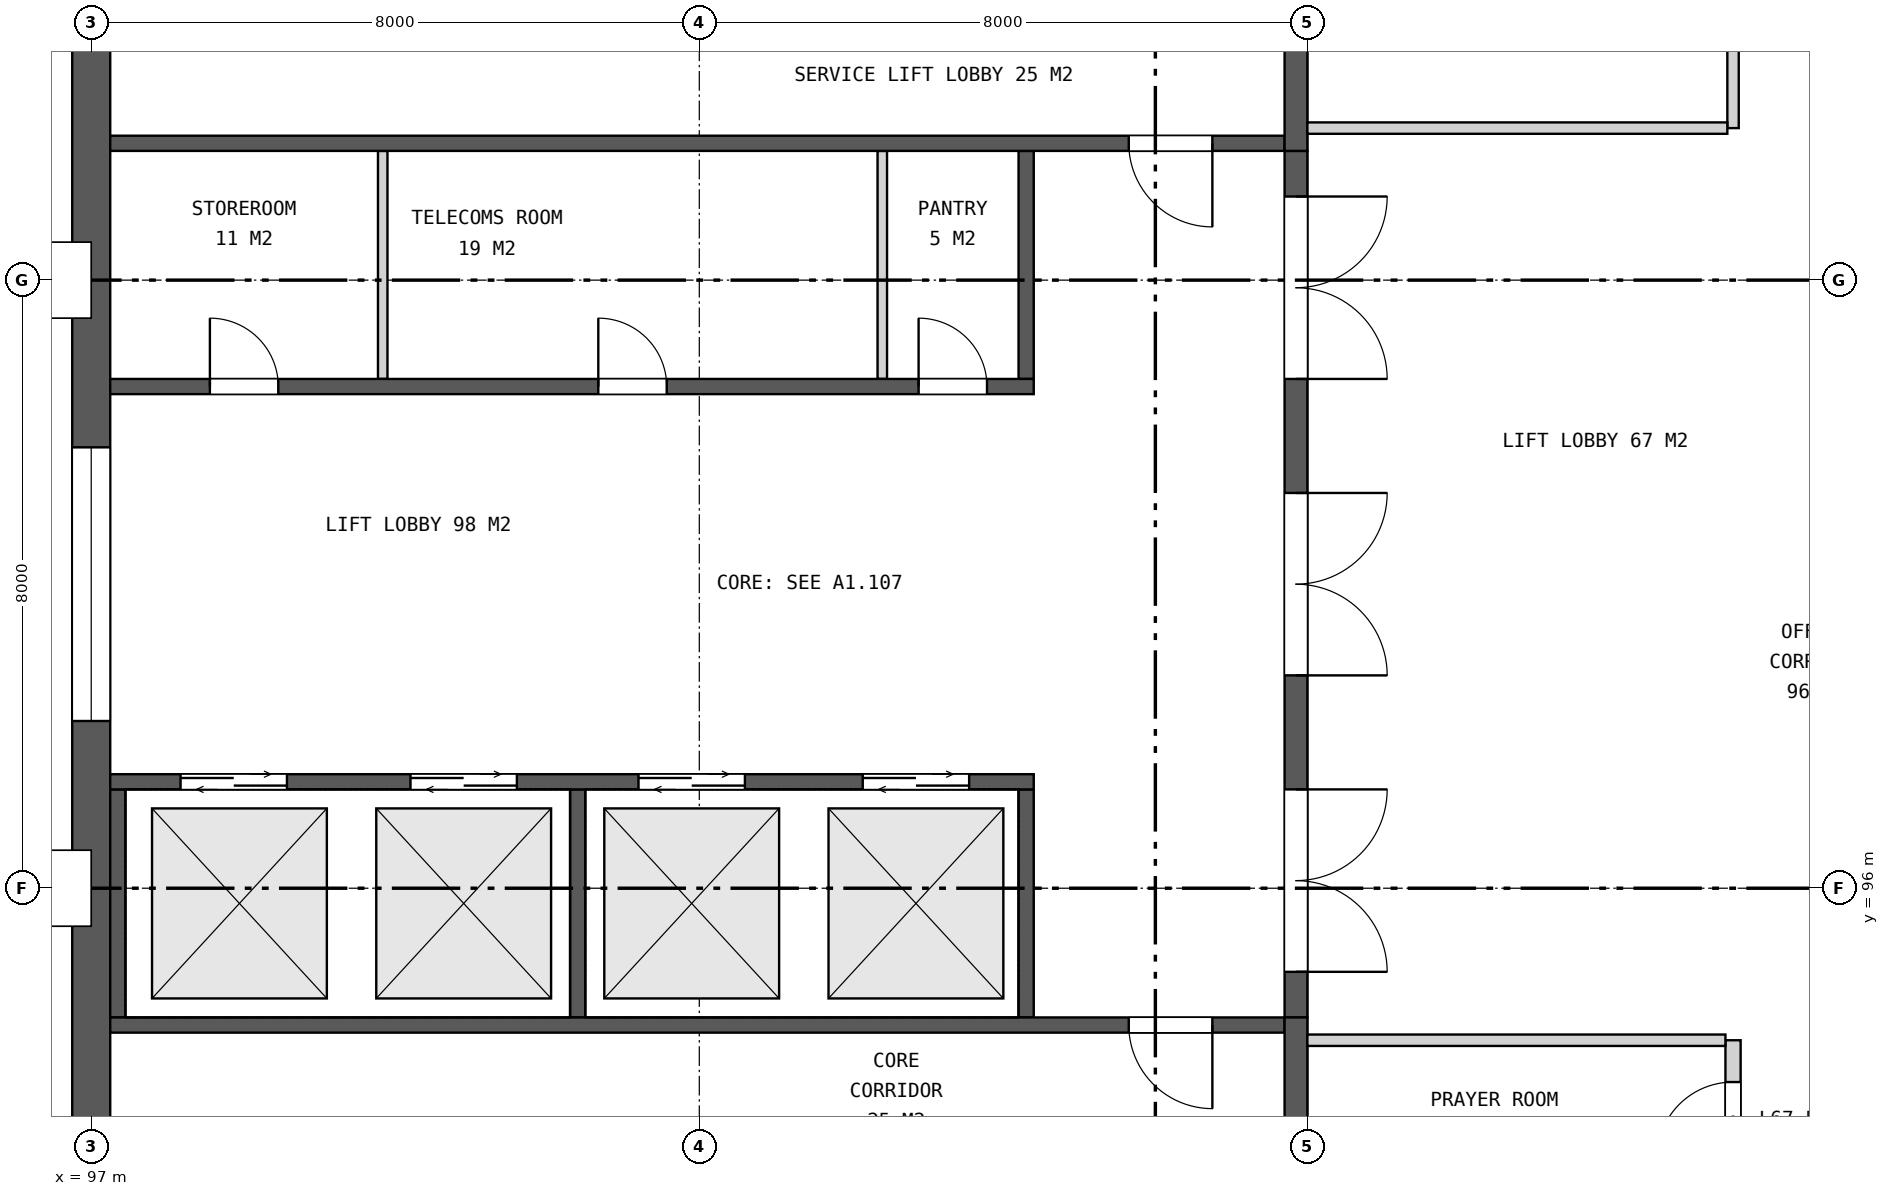
"""IFC4 building model, lengths in metres.
Left out: names, types, materials, properties, quantities, classifications, styles, units other than length and angle.
Written with IfcOpenShell. Run it as: python <this file> out.ifc"""

import sys

from ifc_helpers import new_model, si_unit, direction, frame, frame_2d, origin, place, context, subcontext, project, spatial, rectangle, extrude, element, fill, save


model = new_model("IFC4")
c1 = context("Model", 3, precision=1e-05, world=origin(), true_north=direction((0.0, 1.0)))
c2 = subcontext(c1, "Body", "Model", "MODEL_VIEW")
j1 = project(units=[si_unit("LENGTHUNIT", "METRE"), si_unit("PLANEANGLEUNIT", "RADIAN")], contexts=[c1])
p1 = place(None, origin())
s1 = spatial("IfcSite", under=j1, at=p1, CompositionType="ELEMENT")
p2 = place(p1, origin())
s2 = spatial("IfcBuilding", under=s1, at=p2, CompositionType="ELEMENT")
p3 = place(p2, frame((0.0, 0.0, 311.3)))
s3 = spatial("IfcBuildingStorey", under=s2, at=p3, CompositionType="ELEMENT", Elevation=311.3)
p4 = place(p3, frame((97.0, 111.75, 0.0), z_axis=(0.0, 0.0, 1.0), x_axis=(0.0, -1.0, 0.0)))
e1 = element("IfcWall", 1, at=p4, inside=s3, PredefinedType="SHEAR", context=c2, shape_type="SweptSolid", body=[
    extrude(rectangle(XDim=23.5, YDim=0.5, at=frame_2d((11.75, 0.0))), origin(), (0.0, 0.0, 1.0), 4.2),
])
p5 = place(p4, frame((9.95, 0.0, 0.15)))
e2 = element("IfcOpeningElement", 2, at=p5, cuts=e1, PredefinedType="OPENING", context=c2, shape_type="SweptSolid", body=[
    extrude(rectangle(XDim=3.6, YDim=3.0, at=frame_2d((1.8, 1.5))), frame((0.0, 0.26, 0.0), z_axis=(0.0, -1.0, 0.0), x_axis=(1.0, 0.0, 0.0)), (0.0, 0.0, 1.0), 0.52),
])
p6 = place(p3, frame((112.85, 105.7, 0.0), z_axis=(0.0, 0.0, 1.0), x_axis=(0.0, -1.0, 0.0)))
e3 = element("IfcWall", 3, at=p6, inside=s3, PredefinedType="SHEAR", context=c2, shape_type="SweptSolid", body=[
    extrude(rectangle(XDim=11.4, YDim=0.3, at=frame_2d((5.7, 0.0))), origin(), (0.0, 0.0, 1.0), 4.2),
])
p7 = place(p6, frame((0.6, 0.0, 0.0)))
e4 = element("IfcOpeningElement", 4, at=p7, cuts=e3, PredefinedType="OPENING", context=c2, shape_type="SweptSolid", body=[
    extrude(rectangle(XDim=2.4, YDim=2.4, at=frame_2d((1.2, 1.2))), frame((0.0, 0.16, 0.0), z_axis=(0.0, -1.0, 0.0), x_axis=(1.0, 0.0, 0.0)), (0.0, 0.0, 1.0), 0.32),
])
p8 = place(p6, frame((4.5, 0.0, 0.0)))
e5 = element("IfcOpeningElement", 5, at=p8, cuts=e3, PredefinedType="OPENING", context=c2, shape_type="SweptSolid", body=[
    extrude(rectangle(XDim=2.4, YDim=2.4, at=frame_2d((1.2, 1.2))), frame((0.0, 0.16, 0.0), z_axis=(0.0, -1.0, 0.0), x_axis=(1.0, 0.0, 0.0)), (0.0, 0.0, 1.0), 0.32),
])
p9 = place(p6, frame((8.4, 0.0, 0.0)))
e6 = element("IfcOpeningElement", 6, at=p9, cuts=e3, PredefinedType="OPENING", context=c2, shape_type="SweptSolid", body=[
    extrude(rectangle(XDim=2.4, YDim=2.4, at=frame_2d((1.2, 1.2))), frame((0.0, 0.16, 0.0), z_axis=(0.0, -1.0, 0.0), x_axis=(1.0, 0.0, 0.0)), (0.0, 0.0, 1.0), 0.32),
])
for number, where, z_axis, x_axis in (
    (7, (109.3, 97.3, 0.0), (0.0, 0.0, 1.0), (0.0, -1.0, 0.0)),
    (8, (103.4, 97.3, 0.0), (0.0, 0.0, 1.0), (0.0, -1.0, 0.0)),
    (9, (97.35, 97.3, 0.0), (0.0, 0.0, 1.0), (0.0, -1.0, 0.0)),
):
    element("IfcWall", number, at=place(p3, frame(where, z_axis=z_axis, x_axis=x_axis)), inside=s3, PredefinedType="SHEAR", context=c2, shape_type="SweptSolid", body=[
        extrude(rectangle(XDim=3.0, YDim=0.2, at=frame_2d((1.5, 0.0))), origin(), (0.0, 0.0, 1.0), 4.2),
    ])
p10 = place(p3, frame((109.4, 97.4, 0.0), z_axis=(0.0, 0.0, 1.0), x_axis=(-1.0, 0.0, 0.0)))
e10 = element("IfcWall", 10, at=p10, inside=s3, PredefinedType="SHEAR", context=c2, shape_type="SweptSolid", body=[
    extrude(rectangle(XDim=12.15, YDim=0.2, at=frame_2d((6.075, 0.0))), origin(), (0.0, 0.0, 1.0), 4.2),
])
p11 = place(p10, frame((0.85, 0.0, 0.0)))
e11 = element("IfcOpeningElement", 11, at=p11, cuts=e10, PredefinedType="OPENING", context=c2, shape_type="SweptSolid", body=[
    extrude(rectangle(XDim=1.4, YDim=2.1, at=frame_2d((0.7, 1.05))), frame((0.0, 0.11, 0.0), z_axis=(0.0, -1.0, 0.0), x_axis=(1.0, 0.0, 0.0)), (0.0, 0.0, 1.0), 0.22),
])
p12 = place(p10, frame((3.8, 0.0, 0.0)))
e12 = element("IfcOpeningElement", 12, at=p12, cuts=e10, PredefinedType="OPENING", context=c2, shape_type="SweptSolid", body=[
    extrude(rectangle(XDim=1.4, YDim=2.1, at=frame_2d((0.7, 1.05))), frame((0.0, 0.11, 0.0), z_axis=(0.0, -1.0, 0.0), x_axis=(1.0, 0.0, 0.0)), (0.0, 0.0, 1.0), 0.22),
])
p13 = place(p10, frame((6.8, 0.0, 0.0)))
e13 = element("IfcOpeningElement", 13, at=p13, cuts=e10, PredefinedType="OPENING", context=c2, shape_type="SweptSolid", body=[
    extrude(rectangle(XDim=1.4, YDim=2.1, at=frame_2d((0.7, 1.05))), frame((0.0, 0.11, 0.0), z_axis=(0.0, -1.0, 0.0), x_axis=(1.0, 0.0, 0.0)), (0.0, 0.0, 1.0), 0.22),
])
p14 = place(p10, frame((9.825, 0.0, 0.0)))
e14 = element("IfcOpeningElement", 14, at=p14, cuts=e10, PredefinedType="OPENING", context=c2, shape_type="SweptSolid", body=[
    extrude(rectangle(XDim=1.4, YDim=2.1, at=frame_2d((0.7, 1.05))), frame((0.0, 0.11, 0.0), z_axis=(0.0, -1.0, 0.0), x_axis=(1.0, 0.0, 0.0)), (0.0, 0.0, 1.0), 0.22),
])
p15 = place(p3, frame((109.3, 105.7, 0.0), z_axis=(0.0, 0.0, 1.0), x_axis=(0.0, -1.0, 0.0)))
e15 = element("IfcWall", 15, at=p15, inside=s3, PredefinedType="SHEAR", context=c2, shape_type="SweptSolid", body=[
    extrude(rectangle(XDim=3.0, YDim=0.2, at=frame_2d((1.5, 0.0))), origin(), (0.0, 0.0, 1.0), 4.2),
])
for number, where, z_axis, x_axis in (
    (16, (107.407, 105.7, 0.0), (0.0, 0.0, 1.0), (0.0, -1.0, 0.0)),
    (17, (100.835, 105.7, 0.0), (0.0, 0.0, 1.0), (0.0, -1.0, 0.0)),
):
    element("IfcWall", number, at=place(p3, frame(where, z_axis=z_axis, x_axis=x_axis)), inside=s3, PredefinedType="PARTITIONING", context=c2, shape_type="SweptSolid", body=[
        extrude(rectangle(XDim=3.0, YDim=0.125, at=frame_2d((1.5, 0.0))), origin(), (0.0, 0.0, 1.0), 4.2),
    ])
p16 = place(p3, frame((109.4, 102.6, 0.0), z_axis=(0.0, 0.0, 1.0), x_axis=(-1.0, 0.0, 0.0)))
e18 = element("IfcWall", 18, at=p16, inside=s3, PredefinedType="SHEAR", context=c2, shape_type="SweptSolid", body=[
    extrude(rectangle(XDim=12.15, YDim=0.2, at=frame_2d((6.075, 0.0))), origin(), (0.0, 0.0, 1.0), 4.2),
])
p17 = place(p16, frame((0.615, 0.0, 0.0)))
e19 = element("IfcOpeningElement", 19, at=p17, cuts=e18, PredefinedType="OPENING", context=c2, shape_type="SweptSolid", body=[
    extrude(rectangle(XDim=0.9, YDim=2.1, at=frame_2d((0.45, 1.05))), frame((0.0, 0.11, 0.0), z_axis=(0.0, -1.0, 0.0), x_axis=(1.0, 0.0, 0.0)), (0.0, 0.0, 1.0), 0.22),
])
p18 = place(p16, frame((4.829, 0.0, 0.0)))
e20 = element("IfcOpeningElement", 20, at=p18, cuts=e18, PredefinedType="OPENING", context=c2, shape_type="SweptSolid", body=[
    extrude(rectangle(XDim=0.9, YDim=2.1, at=frame_2d((0.45, 1.05))), frame((0.0, 0.11, 0.0), z_axis=(0.0, -1.0, 0.0), x_axis=(1.0, 0.0, 0.0)), (0.0, 0.0, 1.0), 0.22),
])
p19 = place(p16, frame((9.939, 0.0, 0.0)))
e21 = element("IfcOpeningElement", 21, at=p19, cuts=e18, PredefinedType="OPENING", context=c2, shape_type="SweptSolid", body=[
    extrude(rectangle(XDim=0.9, YDim=2.1, at=frame_2d((0.45, 1.05))), frame((0.0, 0.11, 0.0), z_axis=(0.0, -1.0, 0.0), x_axis=(1.0, 0.0, 0.0)), (0.0, 0.0, 1.0), 0.22),
])
p20 = place(p3, frame((112.7, 94.2, 0.0), z_axis=(0.0, 0.0, 1.0), x_axis=(-1.0, 0.0, 0.0)))
e22 = element("IfcWall", 22, at=p20, inside=s3, PredefinedType="SHEAR", context=c2, shape_type="SweptSolid", body=[
    extrude(rectangle(XDim=15.45, YDim=0.2, at=frame_2d((7.725, 0.0))), origin(), (0.0, 0.0, 1.0), 4.2),
])
p21 = place(p20, frame((0.95, 0.0, 0.0)))
e23 = element("IfcOpeningElement", 23, at=p21, cuts=e22, PredefinedType="OPENING", context=c2, shape_type="SweptSolid", body=[
    extrude(rectangle(XDim=1.1, YDim=2.1, at=frame_2d((0.55, 1.05))), frame((0.0, 0.11, 0.0), z_axis=(0.0, -1.0, 0.0), x_axis=(1.0, 0.0, 0.0)), (0.0, 0.0, 1.0), 0.22),
])
p22 = place(p3, frame((112.85, 94.3, 0.0), z_axis=(0.0, 0.0, 1.0), x_axis=(0.0, -1.0, 0.0)))
e24 = element("IfcWall", 24, at=p22, inside=s3, PredefinedType="SHEAR", context=c2, shape_type="SweptSolid", body=[
    extrude(rectangle(XDim=6.05, YDim=0.3, at=frame_2d((3.025, 0.0))), origin(), (0.0, 0.0, 1.0), 4.2),
])
p23 = place(p3, frame((112.7, 105.8, 0.0), z_axis=(0.0, 0.0, 1.0), x_axis=(-1.0, 0.0, 0.0)))
e25 = element("IfcWall", 25, at=p23, inside=s3, PredefinedType="SHEAR", context=c2, shape_type="SweptSolid", body=[
    extrude(rectangle(XDim=15.45, YDim=0.2, at=frame_2d((7.725, 0.0))), origin(), (0.0, 0.0, 1.0), 4.2),
])
p24 = place(p23, frame((0.95, 0.0, 0.0)))
e26 = element("IfcOpeningElement", 26, at=p24, cuts=e25, PredefinedType="OPENING", context=c2, shape_type="SweptSolid", body=[
    extrude(rectangle(XDim=1.1, YDim=2.1, at=frame_2d((0.55, 1.05))), frame((0.0, 0.11, 0.0), z_axis=(0.0, -1.0, 0.0), x_axis=(1.0, 0.0, 0.0)), (0.0, 0.0, 1.0), 0.22),
])
p25 = place(p3, frame((112.85, 111.75, 0.0), z_axis=(0.0, 0.0, 1.0), x_axis=(0.0, -1.0, 0.0)))
e27 = element("IfcWall", 27, at=p25, inside=s3, PredefinedType="SHEAR", context=c2, shape_type="SweptSolid", body=[
    extrude(rectangle(XDim=6.05, YDim=0.3, at=frame_2d((3.025, 0.0))), origin(), (0.0, 0.0, 1.0), 4.2),
])
p26 = place(p3, frame((118.6, 80.075, 0.0), z_axis=(0.0, 0.0, 1.0), x_axis=(0.0, 1.0, 0.0)))
e28 = element("IfcWall", 28, at=p26, inside=s3, PredefinedType="SOLIDWALL", context=c2, shape_type="SweptSolid", body=[
    extrude(rectangle(XDim=13.925, YDim=0.2, at=frame_2d((6.962, 0.0))), origin(), (0.0, 0.0, 1.0), 3.443),
])
p27 = place(p26, frame((12.375, 0.0, 0.0)))
e29 = element("IfcOpeningElement", 29, at=p27, cuts=e28, PredefinedType="OPENING", context=c2, shape_type="SweptSolid", body=[
    extrude(rectangle(XDim=1.0, YDim=2.1, at=frame_2d((0.5, 1.05))), frame((0.0, 0.11, 0.0), z_axis=(0.0, -1.0, 0.0), x_axis=(1.0, 0.0, 0.0)), (0.0, 0.0, 1.0), 0.22),
])
p28 = place(p26, frame((10.375, 0.0, 0.0)))
e30 = element("IfcOpeningElement", 30, at=p28, cuts=e28, PredefinedType="OPENING", context=c2, shape_type="SweptSolid", body=[
    extrude(rectangle(XDim=1.0, YDim=2.1, at=frame_2d((0.5, 1.05))), frame((0.0, 0.11, 0.0), z_axis=(0.0, -1.0, 0.0), x_axis=(1.0, 0.0, 0.0)), (0.0, 0.0, 1.0), 0.22),
])
p29 = place(p26, frame((8.375, 0.0, 0.0)))
e31 = element("IfcOpeningElement", 31, at=p29, cuts=e28, PredefinedType="OPENING", context=c2, shape_type="SweptSolid", body=[
    extrude(rectangle(XDim=1.0, YDim=2.1, at=frame_2d((0.5, 1.05))), frame((0.0, 0.11, 0.0), z_axis=(0.0, -1.0, 0.0), x_axis=(1.0, 0.0, 0.0)), (0.0, 0.0, 1.0), 0.22),
])
p30 = place(p26, frame((3.45, 0.0, 0.0)))
e32 = element("IfcOpeningElement", 32, at=p30, cuts=e28, PredefinedType="OPENING", context=c2, shape_type="SweptSolid", body=[
    extrude(rectangle(XDim=1.0, YDim=2.1, at=frame_2d((0.5, 1.05))), frame((0.0, 0.11, 0.0), z_axis=(0.0, -1.0, 0.0), x_axis=(1.0, 0.0, 0.0)), (0.0, 0.0, 1.0), 0.22),
])
p31 = place(p3, frame((118.6, 106.0, 0.0), z_axis=(0.0, 0.0, 1.0), x_axis=(0.0, 1.0, 0.0)))
e33 = element("IfcWall", 33, at=p31, inside=s3, PredefinedType="PARTITIONING", context=c2, shape_type="SweptSolid", body=[
    extrude(rectangle(XDim=13.925, YDim=0.15, at=frame_2d((6.962, 0.0))), origin(), (0.0, 0.0, 1.0), 3.443),
])
p32 = place(p31, frame((1.25, 0.0, 0.0)))
e34 = element("IfcOpeningElement", 34, at=p32, cuts=e33, PredefinedType="OPENING", context=c2, shape_type="SweptSolid", body=[
    extrude(rectangle(XDim=1.0, YDim=2.1, at=frame_2d((0.5, 1.05))), frame((0.0, 0.085, 0.0), z_axis=(0.0, -1.0, 0.0), x_axis=(1.0, 0.0, 0.0)), (0.0, 0.0, 1.0), 0.17),
])
p33 = place(p31, frame((4.25, 0.0, 0.0)))
e35 = element("IfcOpeningElement", 35, at=p33, cuts=e33, PredefinedType="OPENING", context=c2, shape_type="SweptSolid", body=[
    extrude(rectangle(XDim=1.0, YDim=2.1, at=frame_2d((0.5, 1.05))), frame((0.0, 0.085, 0.0), z_axis=(0.0, -1.0, 0.0), x_axis=(1.0, 0.0, 0.0)), (0.0, 0.0, 1.0), 0.17),
])
p34 = place(p31, frame((9.45, 0.0, 0.0)))
e36 = element("IfcOpeningElement", 36, at=p34, cuts=e33, PredefinedType="OPENING", context=c2, shape_type="SweptSolid", body=[
    extrude(rectangle(XDim=1.0, YDim=2.1, at=frame_2d((0.5, 1.05))), frame((0.0, 0.085, 0.0), z_axis=(0.0, -1.0, 0.0), x_axis=(1.0, 0.0, 0.0)), (0.0, 0.0, 1.0), 0.17),
])
p35 = place(p3, frame((113.0, 94.0, 0.0), z_axis=(0.0, 0.0, 1.0), x_axis=(1.0, 0.0, 0.0)))
e37 = element("IfcWall", 37, at=p35, inside=s3, PredefinedType="PARTITIONING", context=c2, shape_type="SweptSolid", body=[
    extrude(rectangle(XDim=5.5, YDim=0.15, at=frame_2d((2.75, 0.0))), origin(), (0.0, 0.0, 1.0), 3.443),
])
p36 = place(p3, frame((113.0, 106.0, 0.0), z_axis=(0.0, 0.0, 1.0), x_axis=(1.0, 0.0, 0.0)))
e38 = element("IfcWall", 38, at=p36, inside=s3, PredefinedType="PARTITIONING", context=c2, shape_type="SweptSolid", body=[
    extrude(rectangle(XDim=5.525, YDim=0.15, at=frame_2d((2.762, 0.0))), origin(), (0.0, 0.0, 1.0), 3.443),
])
p37 = place(p5, origin())
e39 = element("IfcWindow", 39, at=p37, inside=s3, PartitioningType="SINGLE_PANEL", PredefinedType="WINDOW", context=c2, shape_type="SweptSolid", body=[
    extrude(rectangle(XDim=3.6, YDim=3.0, at=frame_2d((1.8, 1.5))), frame((0.0, 0.03, 0.0), z_axis=(0.0, -1.0, 0.0), x_axis=(1.0, 0.0, 0.0)), (0.0, 0.0, 1.0), 0.06),
])
fill(e2, e39)
p38 = place(p7, origin())
e40 = element("IfcDoor", 40, at=p38, inside=s3, OperationType="DOUBLE_DOOR_SINGLE_SWING", PredefinedType="DOOR", context=c2, shape_type="SweptSolid", body=[
    extrude(rectangle(XDim=2.4, YDim=2.4, at=frame_2d((1.2, 1.2))), frame((0.0, 0.025, 0.0), z_axis=(0.0, -1.0, 0.0), x_axis=(1.0, 0.0, 0.0)), (0.0, 0.0, 1.0), 0.05),
])
fill(e4, e40)
p39 = place(p8, origin())
e41 = element("IfcDoor", 41, at=p39, inside=s3, OperationType="DOUBLE_DOOR_SINGLE_SWING", PredefinedType="DOOR", context=c2, shape_type="SweptSolid", body=[
    extrude(rectangle(XDim=2.4, YDim=2.4, at=frame_2d((1.2, 1.2))), frame((0.0, 0.025, 0.0), z_axis=(0.0, -1.0, 0.0), x_axis=(1.0, 0.0, 0.0)), (0.0, 0.0, 1.0), 0.05),
])
fill(e5, e41)
p40 = place(p9, origin())
e42 = element("IfcDoor", 42, at=p40, inside=s3, OperationType="DOUBLE_DOOR_SINGLE_SWING", PredefinedType="DOOR", context=c2, shape_type="SweptSolid", body=[
    extrude(rectangle(XDim=2.4, YDim=2.4, at=frame_2d((1.2, 1.2))), frame((0.0, 0.025, 0.0), z_axis=(0.0, -1.0, 0.0), x_axis=(1.0, 0.0, 0.0)), (0.0, 0.0, 1.0), 0.05),
])
fill(e6, e42)
p41 = place(p11, origin())
e43 = element("IfcDoor", 43, at=p41, inside=s3, OperationType="DOUBLE_DOOR_SLIDING", PredefinedType="DOOR", context=c2, shape_type="SweptSolid", body=[
    extrude(rectangle(XDim=1.4, YDim=2.1, at=frame_2d((0.7, 1.05))), frame((0.0, 0.025, 0.0), z_axis=(0.0, -1.0, 0.0), x_axis=(1.0, 0.0, 0.0)), (0.0, 0.0, 1.0), 0.05),
])
fill(e11, e43)
p42 = place(p12, origin())
e44 = element("IfcDoor", 44, at=p42, inside=s3, OperationType="DOUBLE_DOOR_SLIDING", PredefinedType="DOOR", context=c2, shape_type="SweptSolid", body=[
    extrude(rectangle(XDim=1.4, YDim=2.1, at=frame_2d((0.7, 1.05))), frame((0.0, 0.025, 0.0), z_axis=(0.0, -1.0, 0.0), x_axis=(1.0, 0.0, 0.0)), (0.0, 0.0, 1.0), 0.05),
])
fill(e12, e44)
p43 = place(p13, origin())
e45 = element("IfcDoor", 45, at=p43, inside=s3, OperationType="DOUBLE_DOOR_SLIDING", PredefinedType="DOOR", context=c2, shape_type="SweptSolid", body=[
    extrude(rectangle(XDim=1.4, YDim=2.1, at=frame_2d((0.7, 1.05))), frame((0.0, 0.025, 0.0), z_axis=(0.0, -1.0, 0.0), x_axis=(1.0, 0.0, 0.0)), (0.0, 0.0, 1.0), 0.05),
])
fill(e13, e45)
p44 = place(p14, origin())
e46 = element("IfcDoor", 46, at=p44, inside=s3, OperationType="DOUBLE_DOOR_SLIDING", PredefinedType="DOOR", context=c2, shape_type="SweptSolid", body=[
    extrude(rectangle(XDim=1.4, YDim=2.1, at=frame_2d((0.7, 1.05))), frame((0.0, 0.025, 0.0), z_axis=(0.0, -1.0, 0.0), x_axis=(1.0, 0.0, 0.0)), (0.0, 0.0, 1.0), 0.05),
])
fill(e14, e46)
p45 = place(p17, frame((0.9, 0.0, 0.0), z_axis=(0.0, 0.0, 1.0), x_axis=(-1.0, 0.0, 0.0)))
e47 = element("IfcDoor", 47, at=p45, inside=s3, OperationType="SINGLE_SWING_LEFT", PredefinedType="DOOR", context=c2, shape_type="SweptSolid", body=[
    extrude(rectangle(XDim=0.9, YDim=2.1, at=frame_2d((0.45, 1.05))), frame((0.0, 0.025, 0.0), z_axis=(0.0, -1.0, 0.0), x_axis=(1.0, 0.0, 0.0)), (0.0, 0.0, 1.0), 0.05),
])
fill(e19, e47)
p46 = place(p18, frame((0.9, 0.0, 0.0), z_axis=(0.0, 0.0, 1.0), x_axis=(-1.0, 0.0, 0.0)))
e48 = element("IfcDoor", 48, at=p46, inside=s3, OperationType="SINGLE_SWING_LEFT", PredefinedType="DOOR", context=c2, shape_type="SweptSolid", body=[
    extrude(rectangle(XDim=0.9, YDim=2.1, at=frame_2d((0.45, 1.05))), frame((0.0, 0.025, 0.0), z_axis=(0.0, -1.0, 0.0), x_axis=(1.0, 0.0, 0.0)), (0.0, 0.0, 1.0), 0.05),
])
fill(e20, e48)
p47 = place(p19, frame((0.9, 0.0, 0.0), z_axis=(0.0, 0.0, 1.0), x_axis=(-1.0, 0.0, 0.0)))
e49 = element("IfcDoor", 49, at=p47, inside=s3, OperationType="SINGLE_SWING_LEFT", PredefinedType="DOOR", context=c2, shape_type="SweptSolid", body=[
    extrude(rectangle(XDim=0.9, YDim=2.1, at=frame_2d((0.45, 1.05))), frame((0.0, 0.025, 0.0), z_axis=(0.0, -1.0, 0.0), x_axis=(1.0, 0.0, 0.0)), (0.0, 0.0, 1.0), 0.05),
])
fill(e21, e49)
p48 = place(p21, origin())
e50 = element("IfcDoor", 50, at=p48, inside=s3, OperationType="SINGLE_SWING_LEFT", PredefinedType="DOOR", context=c2, shape_type="SweptSolid", body=[
    extrude(rectangle(XDim=1.1, YDim=2.1, at=frame_2d((0.55, 1.05))), frame((0.0, 0.025, 0.0), z_axis=(0.0, -1.0, 0.0), x_axis=(1.0, 0.0, 0.0)), (0.0, 0.0, 1.0), 0.05),
])
fill(e23, e50)
p49 = place(p24, origin())
e51 = element("IfcDoor", 51, at=p49, inside=s3, OperationType="SINGLE_SWING_LEFT", PredefinedType="DOOR", context=c2, shape_type="SweptSolid", body=[
    extrude(rectangle(XDim=1.1, YDim=2.1, at=frame_2d((0.55, 1.05))), frame((0.0, 0.025, 0.0), z_axis=(0.0, -1.0, 0.0), x_axis=(1.0, 0.0, 0.0)), (0.0, 0.0, 1.0), 0.05),
])
fill(e26, e51)
p50 = place(p27, origin())
e52 = element("IfcDoor", 52, at=p50, inside=s3, OperationType="SINGLE_SWING_LEFT", PredefinedType="DOOR", context=c2, shape_type="SweptSolid", body=[
    extrude(rectangle(XDim=1.0, YDim=2.1, at=frame_2d((0.5, 1.05))), frame((0.0, 0.025, 0.0), z_axis=(0.0, -1.0, 0.0), x_axis=(1.0, 0.0, 0.0)), (0.0, 0.0, 1.0), 0.05),
])
fill(e29, e52)
save(model, sys.argv[1])
